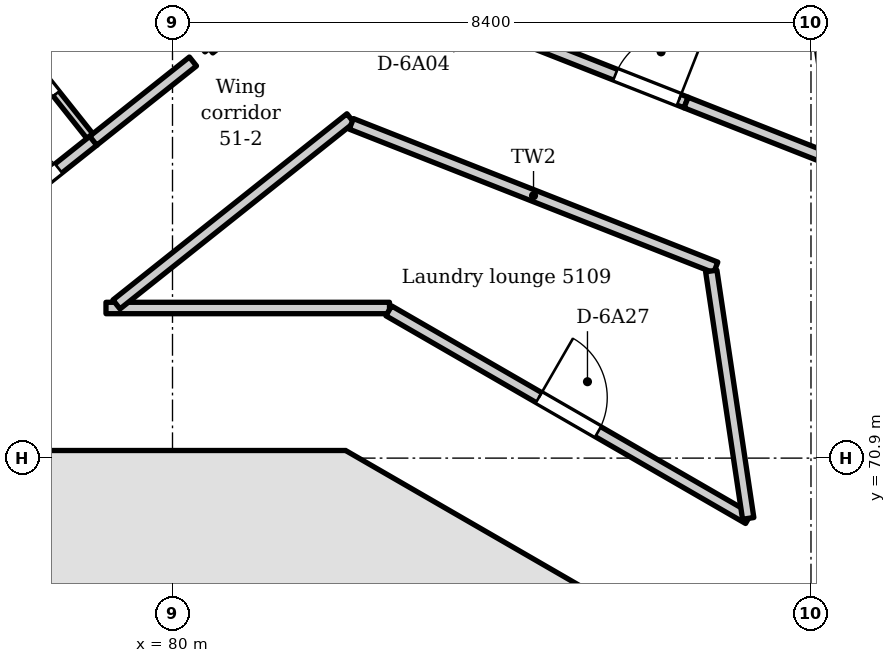
"""IFC4 building model, lengths in metres.
Left out: names, types, materials, properties, quantities, classifications, styles, units other than length and angle.
Written with IfcOpenShell. Run it as: python <this file> out.ifc"""

import sys

from ifc_helpers import new_model, si_unit, direction, frame, frame_2d, origin, place, context, subcontext, project, spatial, polyline, rectangle, outline, extrude, element, fill, save


model = new_model("IFC4")
c1 = context("Model", 3, precision=1e-05, world=origin(), true_north=direction((0.0, 1.0)))
c2 = subcontext(c1, "Body", "Model", "MODEL_VIEW")
j1 = project(units=[si_unit("LENGTHUNIT", "METRE"), si_unit("PLANEANGLEUNIT", "RADIAN")], contexts=[c1])
p1 = place(None, origin())
s1 = spatial("IfcSite", under=j1, at=p1, CompositionType="ELEMENT")
p2 = place(p1, origin())
s2 = spatial("IfcBuilding", under=s1, at=p2, CompositionType="ELEMENT")
p3 = place(p2, frame((0.0, 0.0, 198.0)))
s3 = spatial("IfcBuildingStorey", under=s2, at=p3, CompositionType="ELEMENT", Elevation=198.0)
p4 = place(p3, frame((86.048, 68.419, 0.0), z_axis=(0.0, 0.0, 1.0), x_axis=(-0.866034756103, 0.499983800959, 0.0)))
e1 = element("IfcWall", 1, at=p4, inside=s3, PredefinedType="SHEAR", context=c2, shape_type="SweptSolid", body=[
    extrude(outline(polyline([(0.0, -0.35), (4.555, -0.35), (4.368, 0.35), (0.188, 0.35), (0.0, -0.35)])), origin(), (0.0, 0.0, 1.0), 3.6),
])
p5 = place(p4, frame((2.991, 0.0, 0.0)))
e2 = element("IfcOpeningElement", 2, at=p5, cuts=e1, PredefinedType="OPENING", context=c2, shape_type="SweptSolid", body=[
    extrude(rectangle(XDim=0.9, YDim=2.1, at=frame_2d((0.45, 1.05))), frame((0.0, 0.36, 0.0), z_axis=(0.0, -1.0, 0.0), x_axis=(1.0, 0.0, 0.0)), (0.0, 0.0, 1.0), 0.72),
])
p6 = place(p3, frame((82.278, 70.65, 0.0), z_axis=(0.0, 0.0, 1.0), x_axis=(-1.0, 0.0, 0.0)))
e3 = element("IfcWall", 3, at=p6, inside=s3, PredefinedType="SHEAR", context=c2, shape_type="SweptSolid", body=[
    extrude(outline(polyline([(0.0, -0.35), (4.555, -0.35), (4.368, 0.35), (0.188, 0.35), (0.0, -0.35)])), origin(), (0.0, 0.0, 1.0), 3.6),
])
p7 = place(p6, frame((1.578, 0.0, 0.0)))
e4 = element("IfcOpeningElement", 4, at=p7, cuts=e3, PredefinedType="OPENING", context=c2, shape_type="SweptSolid", body=[
    extrude(rectangle(XDim=1.4, YDim=2.1, at=frame_2d((0.7, 1.05))), frame((0.0, 0.36, 0.0), z_axis=(0.0, -1.0, 0.0), x_axis=(1.0, 0.0, 0.0)), (0.0, 0.0, 1.0), 0.72),
])
for number, where, z_axis, x_axis in (
    (5, (78.425, 63.001, 0.0), (0.0, 0.0, 1.0), (0.0, 1.0, 0.0)),
    (6, (81.575, 63.001, 0.0), (0.0, 0.0, 1.0), (0.0, 1.0, 0.0)),
):
    element("IfcWall", number, at=place(p3, frame(where, z_axis=z_axis, x_axis=x_axis)), inside=s3, PredefinedType="SHEAR", context=c2, shape_type="SweptSolid", body=[
        extrude(rectangle(XDim=7.299, YDim=0.3, at=frame_2d((3.649, 0.0))), origin(), (0.0, 0.0, 1.0), 3.6),
    ])
p8 = place(p3, frame((54.651, 62.686, 0.0), z_axis=(0.0, 0.0, 1.0), x_axis=(0.782609620341, 0.622512796776, 0.0)))
e7 = element("IfcWall", 7, at=p8, inside=s3, PredefinedType="SOLIDWALL", context=c2, shape_type="SweptSolid", body=[
    extrude(outline(polyline([(0.149, 0.075), (0.149, -0.075), (39.297, -0.075), (39.297, 0.075), (0.149, 0.075)])), origin(), (0.0, 0.0, 1.0), 3.3),
])
p9 = place(p8, frame((1.193, 0.0, 0.0)))
e8 = element("IfcOpeningElement", 8, at=p9, cuts=e7, PredefinedType="OPENING", context=c2, shape_type="SweptSolid", body=[
    extrude(rectangle(XDim=1.8, YDim=2.6, at=frame_2d((0.9, 1.3))), frame((0.0, 0.085, 0.0), z_axis=(0.0, -1.0, 0.0), x_axis=(1.0, 0.0, 0.0)), (0.0, 0.0, 1.0), 0.17),
])
p10 = place(p8, frame((4.479, 0.0, 0.0)))
e9 = element("IfcOpeningElement", 9, at=p10, cuts=e7, PredefinedType="OPENING", context=c2, shape_type="SweptSolid", body=[
    extrude(rectangle(XDim=1.8, YDim=2.6, at=frame_2d((0.9, 1.3))), frame((0.0, 0.085, 0.0), z_axis=(0.0, -1.0, 0.0), x_axis=(1.0, 0.0, 0.0)), (0.0, 0.0, 1.0), 0.17),
])
p11 = place(p8, frame((8.065, 0.0, 0.0)))
e10 = element("IfcOpeningElement", 10, at=p11, cuts=e7, PredefinedType="OPENING", context=c2, shape_type="SweptSolid", body=[
    extrude(rectangle(XDim=1.8, YDim=2.6, at=frame_2d((0.9, 1.3))), frame((0.0, 0.085, 0.0), z_axis=(0.0, -1.0, 0.0), x_axis=(1.0, 0.0, 0.0)), (0.0, 0.0, 1.0), 0.17),
])
p12 = place(p8, frame((11.651, 0.0, 0.0)))
e11 = element("IfcOpeningElement", 11, at=p12, cuts=e7, PredefinedType="OPENING", context=c2, shape_type="SweptSolid", body=[
    extrude(rectangle(XDim=1.8, YDim=2.6, at=frame_2d((0.9, 1.3))), frame((0.0, 0.085, 0.0), z_axis=(0.0, -1.0, 0.0), x_axis=(1.0, 0.0, 0.0)), (0.0, 0.0, 1.0), 0.17),
])
p13 = place(p8, frame((15.237, 0.0, 0.0)))
e12 = element("IfcOpeningElement", 12, at=p13, cuts=e7, PredefinedType="OPENING", context=c2, shape_type="SweptSolid", body=[
    extrude(rectangle(XDim=1.8, YDim=2.6, at=frame_2d((0.9, 1.3))), frame((0.0, 0.085, 0.0), z_axis=(0.0, -1.0, 0.0), x_axis=(1.0, 0.0, 0.0)), (0.0, 0.0, 1.0), 0.17),
])
p14 = place(p8, frame((18.823, 0.0, 0.0)))
e13 = element("IfcOpeningElement", 13, at=p14, cuts=e7, PredefinedType="OPENING", context=c2, shape_type="SweptSolid", body=[
    extrude(rectangle(XDim=1.8, YDim=2.6, at=frame_2d((0.9, 1.3))), frame((0.0, 0.085, 0.0), z_axis=(0.0, -1.0, 0.0), x_axis=(1.0, 0.0, 0.0)), (0.0, 0.0, 1.0), 0.17),
])
p15 = place(p8, frame((22.409, 0.0, 0.0)))
e14 = element("IfcOpeningElement", 14, at=p15, cuts=e7, PredefinedType="OPENING", context=c2, shape_type="SweptSolid", body=[
    extrude(rectangle(XDim=1.8, YDim=2.6, at=frame_2d((0.9, 1.3))), frame((0.0, 0.085, 0.0), z_axis=(0.0, -1.0, 0.0), x_axis=(1.0, 0.0, 0.0)), (0.0, 0.0, 1.0), 0.17),
])
p16 = place(p8, frame((25.995, 0.0, 0.0)))
e15 = element("IfcOpeningElement", 15, at=p16, cuts=e7, PredefinedType="OPENING", context=c2, shape_type="SweptSolid", body=[
    extrude(rectangle(XDim=1.8, YDim=2.6, at=frame_2d((0.9, 1.3))), frame((0.0, 0.085, 0.0), z_axis=(0.0, -1.0, 0.0), x_axis=(1.0, 0.0, 0.0)), (0.0, 0.0, 1.0), 0.17),
])
p17 = place(p8, frame((29.581, 0.0, 0.0)))
e16 = element("IfcOpeningElement", 16, at=p17, cuts=e7, PredefinedType="OPENING", context=c2, shape_type="SweptSolid", body=[
    extrude(rectangle(XDim=1.8, YDim=2.6, at=frame_2d((0.9, 1.3))), frame((0.0, 0.085, 0.0), z_axis=(0.0, -1.0, 0.0), x_axis=(1.0, 0.0, 0.0)), (0.0, 0.0, 1.0), 0.17),
])
p18 = place(p8, frame((33.167, 0.0, 0.0)))
e17 = element("IfcOpeningElement", 17, at=p18, cuts=e7, PredefinedType="OPENING", context=c2, shape_type="SweptSolid", body=[
    extrude(rectangle(XDim=1.8, YDim=2.6, at=frame_2d((0.9, 1.3))), frame((0.0, 0.085, 0.0), z_axis=(0.0, -1.0, 0.0), x_axis=(1.0, 0.0, 0.0)), (0.0, 0.0, 1.0), 0.17),
])
p19 = place(p8, frame((36.453, 0.0, 0.0)))
e18 = element("IfcOpeningElement", 18, at=p19, cuts=e7, PredefinedType="OPENING", context=c2, shape_type="SweptSolid", body=[
    extrude(rectangle(XDim=1.8, YDim=2.6, at=frame_2d((0.9, 1.3))), frame((0.0, 0.085, 0.0), z_axis=(0.0, -1.0, 0.0), x_axis=(1.0, 0.0, 0.0)), (0.0, 0.0, 1.0), 0.17),
])
p20 = place(p3, frame((77.497, 76.916, 0.0), z_axis=(0.0, 0.0, 1.0), x_axis=(0.622625135388, -0.78252024944, 0.0)))
e19 = element("IfcWall", 19, at=p20, inside=s3, PredefinedType="PARTITIONING", context=c2, shape_type="SweptSolid", body=[
    extrude(rectangle(XDim=2.275, YDim=0.1, at=frame_2d((1.138, 0.0))), origin(), (0.0, 0.0, 1.0), 3.3),
])
p21 = place(p20, frame((0.763, 0.0, 0.0)))
e20 = element("IfcOpeningElement", 20, at=p21, cuts=e19, PredefinedType="OPENING", context=c2, shape_type="SweptSolid", body=[
    extrude(rectangle(XDim=0.8, YDim=2.1, at=frame_2d((0.4, 1.05))), frame((0.0, 0.06, 0.0), z_axis=(0.0, -1.0, 0.0), x_axis=(1.0, 0.0, 0.0)), (0.0, 0.0, 1.0), 0.12),
])
p22 = place(p3, frame((77.676, 74.056, 0.0), z_axis=(0.0, 0.0, 1.0), x_axis=(0.782734219596, 0.622356121102, 0.0)))
e21 = element("IfcWall", 21, at=p22, inside=s3, PredefinedType="PARTITIONING", context=c2, shape_type="SweptSolid", body=[
    extrude(rectangle(XDim=1.644, YDim=0.15, at=frame_2d((0.822, 0.0))), origin(), (0.0, 0.0, 1.0), 3.3),
])
p23 = place(p22, frame((0.154, 0.0, 0.0)))
e22 = element("IfcOpeningElement", 22, at=p23, cuts=e21, PredefinedType="OPENING", context=c2, shape_type="SweptSolid", body=[
    extrude(rectangle(XDim=0.9, YDim=2.1, at=frame_2d((0.45, 1.05))), frame((0.0, 0.085, 0.0), z_axis=(0.0, -1.0, 0.0), x_axis=(1.0, 0.0, 0.0)), (0.0, 0.0, 1.0), 0.17),
])
p24 = place(p3, frame((78.957, 75.075, 0.0), z_axis=(0.0, 0.0, 1.0), x_axis=(0.782797783459, 0.622276168764, 0.0)))
e23 = element("IfcWall", 23, at=p24, inside=s3, PredefinedType="PARTITIONING", context=c2, shape_type="SweptSolid", body=[
    extrude(rectangle(XDim=1.676, YDim=0.15, at=frame_2d((0.838, 0.0))), origin(), (0.0, 0.0, 1.0), 3.3),
])
p25 = place(p3, frame((79.125, 72.875, 0.0), z_axis=(0.0, 0.0, 1.0), x_axis=(1.0, 0.0, 0.0)))
e24 = element("IfcWall", 24, at=p25, inside=s3, PredefinedType="PARTITIONING", context=c2, shape_type="SweptSolid", body=[
    extrude(rectangle(XDim=3.73, YDim=0.15, at=frame_2d((1.865, 0.0))), origin(), (0.0, 0.0, 1.0), 3.3),
])
p26 = place(p3, frame((79.263, 72.922, 0.0), z_axis=(0.0, 0.0, 1.0), x_axis=(0.782518607784, 0.622627198629, 0.0)))
e25 = element("IfcWall", 25, at=p26, inside=s3, PredefinedType="PARTITIONING", context=c2, shape_type="SweptSolid", body=[
    extrude(rectangle(XDim=3.935, YDim=0.15, at=frame_2d((1.967, 0.0))), origin(), (0.0, 0.0, 1.0), 3.3),
])
p27 = place(p3, frame((80.483, 76.289, 0.0), z_axis=(0.0, 0.0, 1.0), x_axis=(0.782683898342, 0.622419404643, 0.0)))
e26 = element("IfcWall", 26, at=p27, inside=s3, PredefinedType="PARTITIONING", context=c2, shape_type="SweptSolid", body=[
    extrude(rectangle(XDim=3.589, YDim=0.15, at=frame_2d((1.794, 0.0))), origin(), (0.0, 0.0, 1.0), 3.3),
])
p28 = place(p27, frame((0.841, 0.0, 0.0)))
e27 = element("IfcOpeningElement", 27, at=p28, cuts=e26, PredefinedType="OPENING", context=c2, shape_type="SweptSolid", body=[
    extrude(rectangle(XDim=0.9, YDim=2.1, at=frame_2d((0.45, 1.05))), frame((0.0, 0.085, 0.0), z_axis=(0.0, -1.0, 0.0), x_axis=(1.0, 0.0, 0.0)), (0.0, 0.0, 1.0), 0.17),
])
p29 = place(p3, frame((82.353, 75.298, 0.0), z_axis=(0.0, 0.0, 1.0), x_axis=(0.930366278921, -0.366631404883, 0.0)))
e28 = element("IfcWall", 28, at=p29, inside=s3, PredefinedType="PARTITIONING", context=c2, shape_type="SweptSolid", body=[
    extrude(rectangle(XDim=5.153, YDim=0.15, at=frame_2d((2.576, 0.0))), origin(), (0.0, 0.0, 1.0), 2.8),
])
p30 = place(p3, frame((82.845, 72.837, 0.0), z_axis=(0.0, 0.0, 1.0), x_axis=(0.865990633405, -0.500060219228, 0.0)))
e29 = element("IfcWall", 29, at=p30, inside=s3, PredefinedType="PARTITIONING", context=c2, shape_type="SweptSolid", body=[
    extrude(rectangle(XDim=5.464, YDim=0.15, at=frame_2d((2.732, 0.0))), origin(), (0.0, 0.0, 1.0), 2.8),
])
p31 = place(p30, frame((2.281, 0.0, 0.0)))
e30 = element("IfcOpeningElement", 30, at=p31, cuts=e29, PredefinedType="OPENING", context=c2, shape_type="SweptSolid", body=[
    extrude(rectangle(XDim=0.9, YDim=2.1, at=frame_2d((0.45, 1.05))), frame((0.0, 0.085, 0.0), z_axis=(0.0, -1.0, 0.0), x_axis=(1.0, 0.0, 0.0)), (0.0, 0.0, 1.0), 0.17),
])
p32 = place(p3, frame((83.977, 76.672, 0.0), z_axis=(0.0, 0.0, 1.0), x_axis=(0.930513911047, -0.36625655127, 0.0)))
e31 = element("IfcWall", 31, at=p32, inside=s3, PredefinedType="PARTITIONING", context=c2, shape_type="SweptSolid", body=[
    extrude(rectangle(XDim=2.988, YDim=0.15, at=frame_2d((1.494, 0.0))), origin(), (0.0, 0.0, 1.0), 2.8),
])
p33 = place(p32, frame((1.988, 0.0, 0.0)))
e32 = element("IfcOpeningElement", 32, at=p33, cuts=e31, PredefinedType="OPENING", context=c2, shape_type="SweptSolid", body=[
    extrude(rectangle(XDim=0.9, YDim=2.1, at=frame_2d((0.45, 1.05))), frame((0.0, 0.085, 0.0), z_axis=(0.0, -1.0, 0.0), x_axis=(1.0, 0.0, 0.0)), (0.0, 0.0, 1.0), 0.17),
])
p34 = place(p3, frame((86.757, 75.578, 0.0), z_axis=(0.0, 0.0, 1.0), x_axis=(0.930344172236, -0.366687497997, 0.0)))
e33 = element("IfcWall", 33, at=p34, inside=s3, PredefinedType="PARTITIONING", context=c2, shape_type="SweptSolid", body=[
    extrude(rectangle(XDim=2.24, YDim=0.15, at=frame_2d((1.12, 0.0))), origin(), (0.0, 0.0, 1.0), 3.3),
])
p35 = place(p3, frame((87.088, 73.362, 0.0), z_axis=(0.0, 0.0, 1.0), x_axis=(0.147629393442, -0.989042750437, 0.0)))
e34 = element("IfcWall", 34, at=p35, inside=s3, PredefinedType="PARTITIONING", context=c2, shape_type="SweptSolid", body=[
    extrude(rectangle(XDim=3.291, YDim=0.15, at=frame_2d((1.646, 0.0))), origin(), (0.0, 0.0, 1.0), 3.3),
])
p36 = place(p3, frame((88.278, 78.086, 0.0), z_axis=(0.0, 0.0, 1.0), x_axis=(0.147535964678, -0.989056691563, 0.0)))
e35 = element("IfcWall", 35, at=p36, inside=s3, PredefinedType="PARTITIONING", context=c2, shape_type="SweptSolid", body=[
    extrude(rectangle(XDim=3.28, YDim=0.15, at=frame_2d((1.64, 0.0))), origin(), (0.0, 0.0, 1.0), 3.3),
])
p37 = place(p36, frame((1.79, 0.0, 0.0)))
e36 = element("IfcOpeningElement", 36, at=p37, cuts=e35, PredefinedType="OPENING", context=c2, shape_type="SweptSolid", body=[
    extrude(rectangle(XDim=0.9, YDim=2.1, at=frame_2d((0.45, 1.05))), frame((0.0, 0.085, 0.0), z_axis=(0.0, -1.0, 0.0), x_axis=(1.0, 0.0, 0.0)), (0.0, 0.0, 1.0), 0.17),
])
p38 = place(p33, origin())
e37 = element("IfcDoor", 37, at=p38, inside=s3, OperationType="SINGLE_SWING_RIGHT", PredefinedType="DOOR", context=c2, shape_type="SweptSolid", body=[
    extrude(rectangle(XDim=0.9, YDim=2.1, at=frame_2d((0.45, 1.05))), frame((0.0, 0.025, 0.0), z_axis=(0.0, -1.0, 0.0), x_axis=(1.0, 0.0, 0.0)), (0.0, 0.0, 1.0), 0.05),
])
fill(e32, e37)
p39 = place(p23, origin())
e38 = element("IfcDoor", 38, at=p39, inside=s3, OperationType="SINGLE_SWING_LEFT", PredefinedType="DOOR", context=c2, shape_type="SweptSolid", body=[
    extrude(rectangle(XDim=0.9, YDim=2.1, at=frame_2d((0.45, 1.05))), frame((0.0, 0.025, 0.0), z_axis=(0.0, -1.0, 0.0), x_axis=(1.0, 0.0, 0.0)), (0.0, 0.0, 1.0), 0.05),
])
fill(e22, e38)
p40 = place(p31, origin())
e39 = element("IfcDoor", 39, at=p40, inside=s3, OperationType="SINGLE_SWING_LEFT", PredefinedType="DOOR", context=c2, shape_type="SweptSolid", body=[
    extrude(rectangle(XDim=0.9, YDim=2.1, at=frame_2d((0.45, 1.05))), frame((0.0, 0.025, 0.0), z_axis=(0.0, -1.0, 0.0), x_axis=(1.0, 0.0, 0.0)), (0.0, 0.0, 1.0), 0.05),
])
fill(e30, e39)
p41 = place(p21, frame((0.8, 0.0, 0.0), z_axis=(0.0, 0.0, 1.0), x_axis=(-1.0, 0.0, 0.0)))
e40 = element("IfcDoor", 40, at=p41, inside=s3, OperationType="SINGLE_SWING_LEFT", PredefinedType="DOOR", context=c2, shape_type="SweptSolid", body=[
    extrude(rectangle(XDim=0.8, YDim=2.1, at=frame_2d((0.4, 1.05))), frame((0.0, 0.025, 0.0), z_axis=(0.0, -1.0, 0.0), x_axis=(1.0, 0.0, 0.0)), (0.0, 0.0, 1.0), 0.05),
])
fill(e20, e40)
p42 = place(p7, origin())
e41 = element("IfcDoor", 41, at=p42, inside=s3, OperationType="DOUBLE_DOOR_SINGLE_SWING", PredefinedType="DOOR", context=c2, shape_type="SweptSolid", body=[
    extrude(rectangle(XDim=1.4, YDim=2.1, at=frame_2d((0.7, 1.05))), frame((0.0, 0.025, 0.0), z_axis=(0.0, -1.0, 0.0), x_axis=(1.0, 0.0, 0.0)), (0.0, 0.0, 1.0), 0.05),
])
fill(e4, e41)
p43 = place(p5, origin())
e42 = element("IfcDoor", 42, at=p43, inside=s3, OperationType="SINGLE_SWING_RIGHT", PredefinedType="DOOR", context=c2, shape_type="SweptSolid", body=[
    extrude(rectangle(XDim=0.9, YDim=2.1, at=frame_2d((0.45, 1.05))), frame((0.0, 0.075, 0.0), z_axis=(0.0, -1.0, 0.0), x_axis=(1.0, 0.0, 0.0)), (0.0, 0.0, 1.0), 0.05),
])
fill(e2, e42)
save(model, sys.argv[1])
